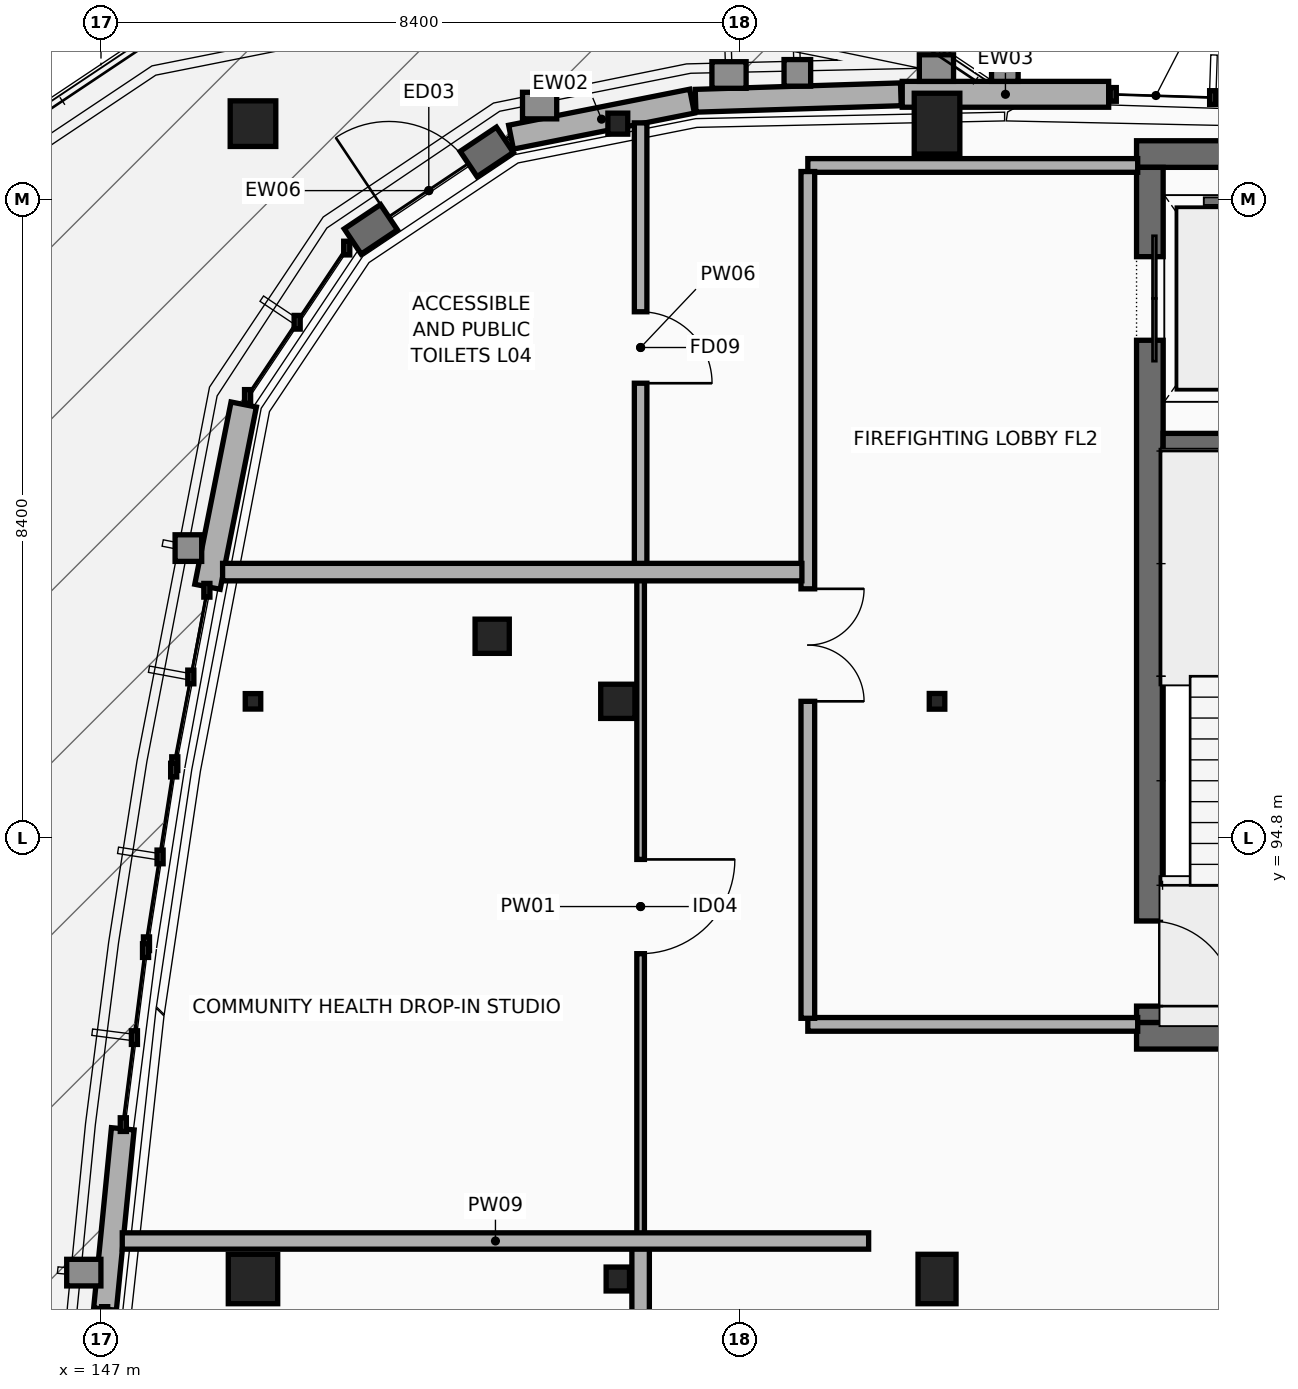
"""IFC4 building model, lengths in metres.
Left out: names, types, materials, properties, quantities, classifications, styles, units other than length and angle.
Written with IfcOpenShell. Run it as: python <this file> out.ifc"""

import sys

from ifc_helpers import new_model, si_unit, direction, frame, frame_2d, origin, origin_2d, place, context, subcontext, project, spatial, rectangle, i_section, extrude, element, fill, save


model = new_model("IFC4")
c1 = context("Model", 3, precision=1e-05, world=origin(), true_north=direction((0.0, 1.0)))
c2 = subcontext(c1, "Body", "Model", "MODEL_VIEW")
j1 = project(units=[si_unit("LENGTHUNIT", "METRE"), si_unit("PLANEANGLEUNIT", "RADIAN")], contexts=[c1])
p1 = place(None, origin())
s1 = spatial("IfcSite", under=j1, at=p1, CompositionType="ELEMENT")
p2 = place(p1, origin())
s2 = spatial("IfcBuilding", under=s1, at=p2, CompositionType="ELEMENT")
p3 = place(p2, frame((0.0, 0.0, 16.2)))
s3 = spatial("IfcBuildingStorey", under=s2, at=p3, CompositionType="ELEMENT", Elevation=16.2)
for number, where, z_axis, x_axis in (
    (1, (160.625, 92.2, 0.0), (0.0, 0.0, 1.0), (1.0, 0.0, 0.0)),
    (2, (165.375, 103.8, 0.0), (0.0, 0.0, 1.0), (-1.0, 0.0, 0.0)),
):
    element("IfcWall", number, at=place(p3, frame(where, z_axis=z_axis, x_axis=x_axis)), inside=s3, PredefinedType="SHEAR", context=c2, shape_type="SweptSolid", body=[
        extrude(rectangle(XDim=4.75, YDim=0.35, at=frame_2d((2.375, 0.0))), origin(), (0.0, 0.0, 1.0), 3.6),
    ])
p4 = place(p3, frame((160.8, 103.625, 0.0), z_axis=(0.0, 0.0, 1.0), x_axis=(0.0, -1.0, 0.0)))
e3 = element("IfcWall", 3, at=p4, inside=s3, PredefinedType="SHEAR", context=c2, shape_type="SweptSolid", body=[
    extrude(rectangle(XDim=11.25, YDim=0.35, at=frame_2d((5.625, 0.0))), origin(), (0.0, 0.0, 1.0), 3.6),
])
p5 = place(p4, frame((1.175, 0.0, 0.0)))
e4 = element("IfcOpeningElement", 4, at=p5, cuts=e3, PredefinedType="OPENING", context=c2, shape_type="SweptSolid", body=[
    extrude(rectangle(XDim=1.1, YDim=2.2, at=frame_2d((0.55, 1.1))), frame((0.0, 0.185, 0.0), z_axis=(0.0, -1.0, 0.0), x_axis=(1.0, 0.0, 0.0)), (0.0, 0.0, 1.0), 0.37),
])
p6 = place(p4, frame((9.915, 0.0, 0.0)))
e5 = element("IfcOpeningElement", 5, at=p6, cuts=e3, PredefinedType="OPENING", context=c2, shape_type="SweptSolid", body=[
    extrude(rectangle(XDim=1.12, YDim=2.16, at=frame_2d((0.56, 1.08))), frame((0.0, 0.185, 0.0), z_axis=(0.0, -1.0, 0.0), x_axis=(1.0, 0.0, 0.0)), (0.0, 0.0, 1.0), 0.37),
])
p7 = place(p3, frame((160.975, 100.0, 0.0), z_axis=(0.0, 0.0, 1.0), x_axis=(1.0, 0.0, 0.0)))
e6 = element("IfcWall", 6, at=p7, inside=s3, PredefinedType="SHEAR", context=c2, shape_type="SweptSolid", body=[
    extrude(rectangle(XDim=4.05, YDim=0.25, at=frame_2d((2.025, 0.0))), origin(), (0.0, 0.0, 1.0), 3.6),
])
p8 = place(p3, frame((149.0, 89.0, 0.0), z_axis=(0.0, 0.0, 1.0), x_axis=(1.0, 0.0, 0.0)))
e7 = element("IfcColumn", 7, at=p8, inside=s3, PredefinedType="COLUMN", context=c2, shape_type="SweptSolid", body=[
    extrude(rectangle(XDim=0.65, YDim=0.65, at=origin_2d()), origin(), (0.0, 0.0, 1.0), 3.6),
])
p9 = place(p3, frame((149.0, 96.6, 0.0), z_axis=(0.0, 0.0, 1.0), x_axis=(1.0, 0.0, 0.0)))
e8 = element("IfcColumn", 8, at=p9, inside=s3, PredefinedType="COLUMN", context=c2, shape_type="SweptSolid", body=[
    extrude(i_section(OverallWidth=0.204, OverallDepth=0.203, WebThickness=0.007, FlangeThickness=0.011, at=origin_2d()), origin(), (0.0, 0.0, 1.0), 3.6),
])
p10 = place(p3, frame((149.0, 104.2, 0.0), z_axis=(0.0, 0.0, 1.0), x_axis=(1.0, 0.0, 0.0)))
e9 = element("IfcColumn", 9, at=p10, inside=s3, PredefinedType="COLUMN", context=c2, shape_type="SweptSolid", body=[
    extrude(rectangle(XDim=0.6, YDim=0.6, at=origin_2d()), origin(), (0.0, 0.0, 1.0), 3.6),
])
p11 = place(p3, frame((153.8, 89.0, 0.0), z_axis=(0.0, 0.0, 1.0), x_axis=(1.0, 0.0, 0.0)))
e10 = element("IfcColumn", 10, at=p11, inside=s3, PredefinedType="COLUMN", context=c2, shape_type="SweptSolid", body=[
    extrude(i_section(OverallWidth=0.307, OverallDepth=0.314, WebThickness=0.012, FlangeThickness=0.019, at=origin_2d()), origin(), (0.0, 0.0, 1.0), 3.6),
])
p12 = place(p3, frame((153.8, 96.6, 0.0), z_axis=(0.0, 0.0, 1.0), x_axis=(1.0, 0.0, 0.0)))
e11 = element("IfcColumn", 11, at=p12, inside=s3, PredefinedType="COLUMN", context=c2, shape_type="SweptSolid", body=[
    extrude(rectangle(XDim=0.45, YDim=0.45, at=origin_2d()), origin(), (0.0, 0.0, 1.0), 3.6),
])
p13 = place(p3, frame((153.8, 104.2, 0.0), z_axis=(0.0, 0.0, 1.0), x_axis=(1.0, 0.0, 0.0)))
e12 = element("IfcColumn", 12, at=p13, inside=s3, PredefinedType="COLUMN", context=c2, shape_type="SweptSolid", body=[
    extrude(i_section(OverallWidth=0.261, OverallDepth=0.276, WebThickness=0.015, FlangeThickness=0.025, at=origin_2d()), origin(), (0.0, 0.0, 1.0), 3.6),
])
p14 = place(p3, frame((158.0, 89.0, 0.0), z_axis=(0.0, 0.0, 1.0), x_axis=(1.0, 0.0, 0.0)))
e13 = element("IfcColumn", 13, at=p14, inside=s3, PredefinedType="COLUMN", context=c2, shape_type="SweptSolid", body=[
    extrude(rectangle(XDim=0.5, YDim=0.65, at=origin_2d()), origin(), (0.0, 0.0, 1.0), 3.6),
])
p15 = place(p3, frame((158.0, 96.6, 0.0), z_axis=(0.0, 0.0, 1.0), x_axis=(1.0, 0.0, 0.0)))
e14 = element("IfcColumn", 14, at=p15, inside=s3, PredefinedType="COLUMN", context=c2, shape_type="SweptSolid", body=[
    extrude(i_section(OverallWidth=0.204, OverallDepth=0.206, WebThickness=0.008, FlangeThickness=0.012, at=origin_2d()), origin(), (0.0, 0.0, 1.0), 3.6),
])
p16 = place(p3, frame((158.0, 104.2, 0.0), z_axis=(0.0, 0.0, 1.0), x_axis=(1.0, 0.0, 0.0)))
e15 = element("IfcColumn", 15, at=p16, inside=s3, PredefinedType="COLUMN", context=c2, shape_type="SweptSolid", body=[
    extrude(rectangle(XDim=0.6, YDim=0.8, at=origin_2d()), origin(), (0.0, 0.0, 1.0), 3.6),
])
p17 = place(p3, frame((152.147, 97.456, 0.0), z_axis=(0.0, 0.0, 1.0), x_axis=(1.0, 0.0, 0.0)))
e16 = element("IfcColumn", 16, at=p17, inside=s3, PredefinedType="COLUMN", context=c2, shape_type="SweptSolid", body=[
    extrude(rectangle(XDim=0.45, YDim=0.45, at=origin_2d()), origin(), (0.0, 0.0, 1.0), 3.353),
])
p18 = place(p3, frame((157.542, 104.586, 0.0), z_axis=(0.0, 0.0, 1.0), x_axis=(1.0, 0.0, 0.0)))
e17 = element("IfcWall", 17, at=p18, inside=s3, PredefinedType="STANDARD", context=c2, shape_type="SweptSolid", body=[
    extrude(rectangle(XDim=2.716, YDim=0.34, at=frame_2d((1.358, 0.0))), origin(), (0.0, 0.0, 1.0), 3.337),
])
p19 = place(p3, frame((154.823, 104.501, 0.0), z_axis=(0.0, 0.0, 1.0), x_axis=(0.99950562043, 0.031440654064, 0.0)))
e18 = element("IfcWall", 18, at=p19, inside=s3, PredefinedType="STANDARD", context=c2, shape_type="SweptSolid", body=[
    extrude(rectangle(XDim=2.702, YDim=0.3, at=frame_2d((1.351, 0.0))), origin(), (0.0, 0.0, 1.0), 2.605),
])
p20 = place(p3, frame((152.395, 104.022, 0.0), z_axis=(0.0, 0.0, 1.0), x_axis=(0.980761961866, 0.195207515624, 0.0)))
e19 = element("IfcWall", 19, at=p20, inside=s3, PredefinedType="STANDARD", context=c2, shape_type="SweptSolid", body=[
    extrude(rectangle(XDim=2.429, YDim=0.32, at=frame_2d((1.214, 0.0))), origin(), (0.0, 0.0, 1.0), 2.605),
])
p21 = place(p3, frame((150.312, 102.65, 0.0), z_axis=(0.0, 0.0, 1.0), x_axis=(0.831378967594, 0.555705868461, 0.0)))
e20 = element("IfcWall", 20, at=p21, inside=s3, PredefinedType="STANDARD", context=c2, shape_type="SweptSolid", body=[
    extrude(rectangle(XDim=2.408, YDim=0.4, at=frame_2d((1.204, 0.0))), origin(), (0.0, 0.0, 1.0), 2.645),
])
p22 = place(p21, frame((0.574, 0.0, 0.0)))
e21 = element("IfcOpeningElement", 21, at=p22, cuts=e20, PredefinedType="OPENING", context=c2, shape_type="SweptSolid", body=[
    extrude(rectangle(XDim=1.26, YDim=2.26, at=frame_2d((0.63, 1.13))), frame((0.0, 0.21, 0.0), z_axis=(0.0, -1.0, 0.0), x_axis=(1.0, 0.0, 0.0)), (0.0, 0.0, 1.0), 0.42),
])
p23 = place(p3, frame((148.401, 98.107, 0.0), z_axis=(0.0, 0.0, 1.0), x_axis=(0.195117479311, 0.980779878091, 0.0)))
e22 = element("IfcWall", 22, at=p23, inside=s3, PredefinedType="STANDARD", context=c2, shape_type="SweptSolid", body=[
    extrude(rectangle(XDim=2.445, YDim=0.34, at=frame_2d((1.222, 0.0))), origin(), (0.0, 0.0, 1.0), 2.862),
])
p24 = place(p3, frame((147.053, 88.604, 0.0), z_axis=(0.0, 0.0, 1.0), x_axis=(0.098225856093, 0.995164147864, 0.0)))
e23 = element("IfcWall", 23, at=p24, inside=s3, PredefinedType="STANDARD", context=c2, shape_type="SweptSolid", body=[
    extrude(rectangle(XDim=2.384, YDim=0.3, at=frame_2d((1.192, 0.0))), origin(), (0.0, 0.0, 1.0), 3.337),
])
p25 = place(p3, frame((156.3, 92.35, 0.0), z_axis=(0.0, 0.0, 1.0), x_axis=(1.0, 0.0, 0.0)))
e24 = element("IfcWall", 24, at=p25, inside=s3, PredefinedType="PARTITIONING", context=c2, shape_type="SweptSolid", body=[
    extrude(rectangle(XDim=4.34, YDim=0.18, at=frame_2d((2.17, 0.0))), origin(), (0.0, 0.0, 1.0), 2.954),
])
p26 = place(p3, frame((160.64, 103.65, 0.0), z_axis=(0.0, 0.0, 1.0), x_axis=(-1.0, 0.0, 0.0)))
e25 = element("IfcWall", 25, at=p26, inside=s3, PredefinedType="PARTITIONING", context=c2, shape_type="SweptSolid", body=[
    extrude(rectangle(XDim=4.34, YDim=0.18, at=frame_2d((2.17, 0.0))), origin(), (0.0, 0.0, 1.0), 2.9),
])
p27 = place(p3, frame((156.3, 103.57, 0.0), z_axis=(0.0, 0.0, 1.0), x_axis=(0.0, -1.0, 0.0)))
e26 = element("IfcWall", 26, at=p27, inside=s3, PredefinedType="PARTITIONING", context=c2, shape_type="SweptSolid", body=[
    extrude(rectangle(XDim=11.14, YDim=0.18, at=frame_2d((5.57, 0.0))), origin(), (0.0, 0.0, 1.0), 2.672),
])
p28 = place(p27, frame((5.49, 0.0, 0.0)))
e27 = element("IfcOpeningElement", 27, at=p28, cuts=e26, PredefinedType="OPENING", context=c2, shape_type="SweptSolid", body=[
    extrude(rectangle(XDim=1.48, YDim=2.22, at=frame_2d((0.74, 1.11))), frame((0.0, 0.1, 0.0), z_axis=(0.0, -1.0, 0.0), x_axis=(1.0, 0.0, 0.0)), (0.0, 0.0, 1.0), 0.2),
])
p29 = place(p3, frame((154.1, 89.5, 0.0), z_axis=(0.0, 0.0, 1.0), x_axis=(0.0, -1.0, 0.0)))
e28 = element("IfcWall", 28, at=p29, inside=s3, PredefinedType="PARTITIONING", context=c2, shape_type="SweptSolid", body=[
    extrude(rectangle(XDim=9.9, YDim=0.23, at=frame_2d((4.95, 0.0))), origin(), (0.0, 0.0, 1.0), 2.752),
])
p30 = place(p29, frame((4.21, 0.0, 0.0)))
e29 = element("IfcOpeningElement", 29, at=p30, cuts=e28, PredefinedType="OPENING", context=c2, shape_type="SweptSolid", body=[
    extrude(rectangle(XDim=1.48, YDim=2.22, at=frame_2d((0.74, 1.11))), frame((0.0, 0.125, 0.0), z_axis=(0.0, -1.0, 0.0), x_axis=(1.0, 0.0, 0.0)), (0.0, 0.0, 1.0), 0.25),
])
p31 = place(p3, frame((154.1, 98.3, 0.0), z_axis=(0.0, 0.0, 1.0), x_axis=(0.0, -1.0, 0.0)))
e30 = element("IfcWall", 30, at=p31, inside=s3, PredefinedType="PARTITIONING", context=c2, shape_type="SweptSolid", body=[
    extrude(rectangle(XDim=8.8, YDim=0.1, at=frame_2d((4.4, 0.0))), origin(), (0.0, 0.0, 1.0), 2.641),
])
p32 = place(p31, frame((3.78, 0.0, 0.0)))
e31 = element("IfcOpeningElement", 31, at=p32, cuts=e30, PredefinedType="OPENING", context=c2, shape_type="SweptSolid", body=[
    extrude(rectangle(XDim=1.24, YDim=2.16, at=frame_2d((0.62, 1.08))), frame((0.0, 0.06, 0.0), z_axis=(0.0, -1.0, 0.0), x_axis=(1.0, 0.0, 0.0)), (0.0, 0.0, 1.0), 0.12),
])
p33 = place(p3, frame((154.1, 104.21, 0.0), z_axis=(0.0, 0.0, 1.0), x_axis=(0.0, -1.0, 0.0)))
e32 = element("IfcWall", 32, at=p33, inside=s3, PredefinedType="PARTITIONING", context=c2, shape_type="SweptSolid", body=[
    extrude(rectangle(XDim=5.91, YDim=0.165, at=frame_2d((2.955, 0.0))), origin(), (0.0, 0.0, 1.0), 2.605),
])
p34 = place(p33, frame((2.485, 0.0, 0.0)))
e33 = element("IfcOpeningElement", 33, at=p34, cuts=e32, PredefinedType="OPENING", context=c2, shape_type="SweptSolid", body=[
    extrude(rectangle(XDim=0.94, YDim=2.1, at=frame_2d((0.47, 1.05))), frame((0.0, 0.093, 0.0), z_axis=(0.0, -1.0, 0.0), x_axis=(1.0, 0.0, 0.0)), (0.0, 0.0, 1.0), 0.185),
])
p35 = place(p3, frame((147.28, 89.5, 0.0), z_axis=(0.0, 0.0, 1.0), x_axis=(1.0, 0.0, 0.0)))
e34 = element("IfcWall", 34, at=p35, inside=s3, PredefinedType="PARTITIONING", context=c2, shape_type="SweptSolid", body=[
    extrude(rectangle(XDim=9.82, YDim=0.215, at=frame_2d((4.91, 0.0))), origin(), (0.0, 0.0, 1.0), 2.748),
])
p36 = place(p3, frame((148.6, 98.3, 0.0), z_axis=(0.0, 0.0, 1.0), x_axis=(1.0, 0.0, 0.0)))
e35 = element("IfcWall", 35, at=p36, inside=s3, PredefinedType="PARTITIONING", context=c2, shape_type="SweptSolid", body=[
    extrude(rectangle(XDim=7.622, YDim=0.23, at=frame_2d((3.811, 0.0))), origin(), (0.0, 0.0, 1.0), 2.641),
])
p37 = place(p22, origin())
e36 = element("IfcDoor", 36, at=p37, inside=s3, OperationType="SINGLE_SWING_LEFT", PredefinedType="DOOR", context=c2, shape_type="SweptSolid", body=[
    extrude(rectangle(XDim=1.26, YDim=2.26, at=frame_2d((0.63, 1.13))), frame((0.0, 0.025, 0.0), z_axis=(0.0, -1.0, 0.0), x_axis=(1.0, 0.0, 0.0)), (0.0, 0.0, 1.0), 0.05),
])
fill(e21, e36)
p38 = place(p5, origin())
e37 = element("IfcDoor", 37, at=p38, inside=s3, OperationType="DOUBLE_DOOR_SLIDING", PredefinedType="DOOR", context=c2, shape_type="SweptSolid", body=[
    extrude(rectangle(XDim=1.1, YDim=2.2, at=frame_2d((0.55, 1.1))), frame((0.0, 0.025, 0.0), z_axis=(0.0, -1.0, 0.0), x_axis=(1.0, 0.0, 0.0)), (0.0, 0.0, 1.0), 0.05),
])
fill(e4, e37)
p39 = place(p6, origin())
e38 = element("IfcDoor", 38, at=p39, inside=s3, OperationType="SINGLE_SWING_RIGHT", PredefinedType="DOOR", context=c2, shape_type="SweptSolid", body=[
    extrude(rectangle(XDim=1.12, YDim=2.16, at=frame_2d((0.56, 1.08))), frame((0.0, 0.025, 0.0), z_axis=(0.0, -1.0, 0.0), x_axis=(1.0, 0.0, 0.0)), (0.0, 0.0, 1.0), 0.05),
])
fill(e5, e38)
p40 = place(p28, origin())
e39 = element("IfcDoor", 39, at=p40, inside=s3, OperationType="DOUBLE_DOOR_SINGLE_SWING", PredefinedType="DOOR", context=c2, shape_type="SweptSolid", body=[
    extrude(rectangle(XDim=1.48, YDim=2.22, at=frame_2d((0.74, 1.11))), frame((0.0, 0.025, 0.0), z_axis=(0.0, -1.0, 0.0), x_axis=(1.0, 0.0, 0.0)), (0.0, 0.0, 1.0), 0.05),
])
fill(e27, e39)
p41 = place(p32, origin())
e40 = element("IfcDoor", 40, at=p41, inside=s3, OperationType="SINGLE_SWING_LEFT", PredefinedType="DOOR", context=c2, shape_type="SweptSolid", body=[
    extrude(rectangle(XDim=1.24, YDim=2.16, at=frame_2d((0.62, 1.08))), frame((0.0, 0.025, 0.0), z_axis=(0.0, -1.0, 0.0), x_axis=(1.0, 0.0, 0.0)), (0.0, 0.0, 1.0), 0.05),
])
fill(e31, e40)
p42 = place(p34, origin())
e41 = element("IfcDoor", 41, at=p42, inside=s3, OperationType="SINGLE_SWING_RIGHT", PredefinedType="DOOR", context=c2, shape_type="SweptSolid", body=[
    extrude(rectangle(XDim=0.94, YDim=2.1, at=frame_2d((0.47, 1.05))), frame((0.0, 0.025, 0.0), z_axis=(0.0, -1.0, 0.0), x_axis=(1.0, 0.0, 0.0)), (0.0, 0.0, 1.0), 0.05),
])
fill(e33, e41)
save(model, sys.argv[1])
